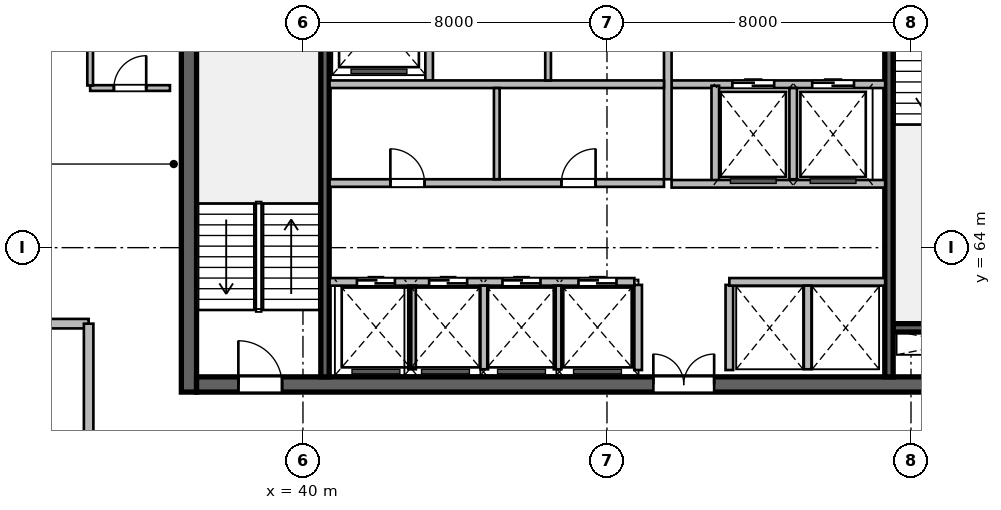
"""IFC4 building model, lengths in metres.
Left out: names, types, materials, properties, quantities, classifications, styles, units other than length and angle.
Written with IfcOpenShell. Run it as: python <this file> out.ifc"""

import sys

from ifc_helpers import new_model, si_unit, direction, frame, frame_2d, origin, place, context, subcontext, project, spatial, rectangle, extrude, source, transform, mapped, element, fill, save


model = new_model("IFC4")
c1 = context("Model", 3, precision=1e-05, world=origin(), true_north=direction((0.0, 1.0)))
c2 = subcontext(c1, "Body", "Model", "MODEL_VIEW")
j1 = project(units=[si_unit("LENGTHUNIT", "METRE"), si_unit("PLANEANGLEUNIT", "RADIAN")], contexts=[c1])
p1 = place(None, origin())
s1 = spatial("IfcSite", under=j1, at=p1, CompositionType="ELEMENT")
p2 = place(p1, origin())
s2 = spatial("IfcBuilding", under=s1, at=p2, CompositionType="ELEMENT")
p3 = place(p2, frame((0.0, 0.0, 267.9)))
s3 = spatial("IfcBuildingStorey", under=s2, at=p3, CompositionType="ELEMENT", Elevation=267.9)
m1 = source(origin(), c2, "Body", "SweptSolid", [
    extrude(rectangle(XDim=12.0, YDim=0.4, at=frame_2d((6.0, 0.0))), origin(), (0.0, 0.0, 1.0), 3.9),
])
p4 = place(p3, frame((37.0, 60.2, 0.0), z_axis=(0.0, 0.0, 1.0), x_axis=(0.0, 1.0, 0.0)))
e1 = element("IfcWall", 1, at=p4, inside=s3, PredefinedType="SHEAR", context=c2, shape_type="MappedRepresentation", body=[
    mapped(m1, transform((0.0, 0.0, 0.0), scale=1.0)),
])
m2 = source(origin(), c2, "Body", "SweptSolid", [
    extrude(rectangle(XDim=21.6, YDim=0.4, at=frame_2d((10.8, 0.0))), origin(), (0.0, 0.0, 1.0), 3.9),
])
p5 = place(p3, frame((37.2, 60.4, 0.0), z_axis=(0.0, 0.0, 1.0), x_axis=(1.0, 0.0, 0.0)))
e2 = element("IfcWall", 2, at=p5, inside=s3, PredefinedType="SHEAR", context=c2, shape_type="MappedRepresentation", body=[
    mapped(m2, transform((0.0, 0.0, 0.0), scale=1.0)),
])
p6 = place(p5, frame((1.1, 0.0, 0.0)))
e3 = element("IfcOpeningElement", 3, at=p6, cuts=e2, PredefinedType="OPENING", context=c2, shape_type="SweptSolid", body=[
    extrude(rectangle(XDim=1.15, YDim=2.15, at=frame_2d((0.575, 1.075))), frame((0.0, 0.21, 0.0), z_axis=(0.0, -1.0, 0.0), x_axis=(1.0, 0.0, 0.0)), (0.0, 0.0, 1.0), 0.42),
])
p7 = place(p5, frame((19.5, 0.0, 0.0)))
e4 = element("IfcOpeningElement", 4, at=p7, cuts=e2, PredefinedType="OPENING", context=c2, shape_type="SweptSolid", body=[
    extrude(rectangle(XDim=0.9, YDim=2.1, at=frame_2d((0.45, 1.05))), frame((0.0, 0.21, 0.0), z_axis=(0.0, -1.0, 0.0), x_axis=(1.0, 0.0, 0.0)), (0.0, 0.0, 1.0), 0.42),
])
p8 = place(p5, frame((12.02, 0.0, 0.0)))
e5 = element("IfcOpeningElement", 5, at=p8, cuts=e2, PredefinedType="OPENING", context=c2, shape_type="SweptSolid", body=[
    extrude(rectangle(XDim=1.6, YDim=2.15, at=frame_2d((0.8, 1.075))), frame((0.0, 0.21, 0.0), z_axis=(0.0, -1.0, 0.0), x_axis=(1.0, 0.0, 0.0)), (0.0, 0.0, 1.0), 0.42),
])
m3 = source(origin(), c2, "Body", "SweptSolid", [
    extrude(rectangle(XDim=3.27, YDim=0.22, at=frame_2d((1.635, 0.0))), origin(), (0.0, 0.0, 1.0), 3.9),
])
p9 = place(p3, frame((55.53, 61.89, 0.0), z_axis=(0.0, 0.0, 1.0), x_axis=(1.0, 0.0, 0.0)))
e6 = element("IfcWall", 6, at=p9, inside=s3, PredefinedType="SHEAR", context=c2, shape_type="MappedRepresentation", body=[
    mapped(m3, transform((0.0, 0.0, 0.0), scale=1.0)),
])
m4 = source(origin(), c2, "Body", "SweptSolid", [
    extrude(rectangle(XDim=11.2, YDim=0.22, at=frame_2d((5.6, 0.0))), origin(), (0.0, 0.0, 1.0), 3.9),
])
p10 = place(p3, frame((40.58, 60.6, 0.0), z_axis=(0.0, 0.0, 1.0), x_axis=(0.0, 1.0, 0.0)))
e7 = element("IfcWall", 7, at=p10, inside=s3, PredefinedType="SHEAR", context=c2, shape_type="MappedRepresentation", body=[
    mapped(m4, transform((0.0, 0.0, 0.0), scale=1.0)),
])
p11 = place(p3, frame((55.42, 60.6, 0.0), z_axis=(0.0, 0.0, 1.0), x_axis=(0.0, 1.0, 0.0)))
e8 = element("IfcWall", 8, at=p11, inside=s3, PredefinedType="SHEAR", context=c2, shape_type="MappedRepresentation", body=[
    mapped(m4, transform((0.0, 0.0, 0.0), scale=1.0)),
])
p12 = place(p11, frame((9.645, 0.0, 0.0)))
e9 = element("IfcOpeningElement", 9, at=p12, cuts=e8, PredefinedType="OPENING", context=c2, shape_type="SweptSolid", body=[
    extrude(rectangle(XDim=1.15, YDim=2.15, at=frame_2d((0.575, 1.075))), frame((0.0, 0.12, 0.0), z_axis=(0.0, -1.0, 0.0), x_axis=(1.0, 0.0, 0.0)), (0.0, 0.0, 1.0), 0.24),
])
m5 = source(origin(), c2, "Body", "SweptSolid", [
    extrude(rectangle(XDim=2.24, YDim=0.2, at=frame_2d((1.12, 0.0))), origin(), (0.0, 0.0, 1.0), 3.65),
])
for number, where, z_axis, x_axis in (
    (10, (48.82, 60.78, 0.0), (0.0, 0.0, 1.0), (0.0, 1.0, 0.0)),
    (11, (51.22, 60.78, 0.0), (0.0, 0.0, 1.0), (0.0, 1.0, 0.0)),
):
    element("IfcWall", number, at=place(p3, frame(where, z_axis=z_axis, x_axis=x_axis)), inside=s3, PredefinedType="SOLIDWALL", context=c2, shape_type="MappedRepresentation", body=[
        mapped(m5, transform((0.0, 0.0, 0.0), scale=1.0)),
    ])
m6 = source(origin(), c2, "Body", "SweptSolid", [
    extrude(rectangle(XDim=5.62, YDim=0.2, at=frame_2d((2.81, 0.0))), origin(), (0.0, 0.0, 1.0), 3.65),
])
p13 = place(p3, frame((49.7, 68.3, 0.0), z_axis=(0.0, 0.0, 1.0), x_axis=(1.0, 0.0, 0.0)))
e12 = element("IfcWall", 12, at=p13, inside=s3, PredefinedType="SOLIDWALL", context=c2, shape_type="MappedRepresentation", body=[
    mapped(m6, transform((0.0, 0.0, 0.0), scale=1.0)),
])
p14 = place(p13, frame((1.6, 0.0, 0.0)))
e13 = element("IfcOpeningElement", 13, at=p14, cuts=e12, PredefinedType="OPENING", context=c2, shape_type="SweptSolid", body=[
    extrude(rectangle(XDim=1.1, YDim=2.15, at=frame_2d((0.55, 1.075))), frame((0.0, 0.11, 0.0), z_axis=(0.0, -1.0, 0.0), x_axis=(1.0, 0.0, 0.0)), (0.0, 0.0, 1.0), 0.22),
])
p15 = place(p13, frame((3.7, 0.0, 0.0)))
e14 = element("IfcOpeningElement", 14, at=p15, cuts=e12, PredefinedType="OPENING", context=c2, shape_type="SweptSolid", body=[
    extrude(rectangle(XDim=1.1, YDim=2.15, at=frame_2d((0.55, 1.075))), frame((0.0, 0.11, 0.0), z_axis=(0.0, -1.0, 0.0), x_axis=(1.0, 0.0, 0.0)), (0.0, 0.0, 1.0), 0.22),
])
m7 = source(origin(), c2, "Body", "SweptSolid", [
    extrude(rectangle(XDim=5.8, YDim=0.2, at=frame_2d((2.9, 0.0))), origin(), (0.0, 0.0, 1.0), 3.65),
])
p16 = place(p3, frame((49.6, 65.8, 0.0), z_axis=(0.0, 0.0, 1.0), x_axis=(0.0, 1.0, 0.0)))
e15 = element("IfcWall", 15, at=p16, inside=s3, PredefinedType="SOLIDWALL", context=c2, shape_type="MappedRepresentation", body=[
    mapped(m7, transform((0.0, 0.0, 0.0), scale=1.0)),
])
m8 = source(origin(), c2, "Body", "SweptSolid", [
    extrude(rectangle(XDim=2.58, YDim=0.2, at=frame_2d((1.29, 0.0))), origin(), (0.0, 0.0, 1.0), 3.65),
])
p17 = place(p3, frame((50.85, 65.68, 0.0), z_axis=(0.0, 0.0, 1.0), x_axis=(0.0, 1.0, 0.0)))
e16 = element("IfcWall", 16, at=p17, inside=s3, PredefinedType="SOLIDWALL", context=c2, shape_type="MappedRepresentation", body=[
    mapped(m8, transform((0.0, 0.0, 0.0), scale=1.0)),
])
m9 = source(origin(), c2, "Body", "SweptSolid", [
    extrude(rectangle(XDim=2.4, YDim=0.2, at=frame_2d((1.2, 0.0))), origin(), (0.0, 0.0, 1.0), 3.65),
])
p18 = place(p3, frame((52.9, 65.8, 0.0), z_axis=(0.0, 0.0, 1.0), x_axis=(0.0, 1.0, 0.0)))
e17 = element("IfcWall", 17, at=p18, inside=s3, PredefinedType="SOLIDWALL", context=c2, shape_type="MappedRepresentation", body=[
    mapped(m9, transform((0.0, 0.0, 0.0), scale=1.0)),
])
p19 = place(p3, frame((49.7, 65.68, 0.0), z_axis=(0.0, 0.0, 1.0), x_axis=(1.0, 0.0, 0.0)))
e18 = element("IfcWall", 18, at=p19, inside=s3, PredefinedType="SOLIDWALL", context=c2, shape_type="MappedRepresentation", body=[
    mapped(m6, transform((0.0, 0.0, 0.0), scale=1.0)),
])
m10 = source(origin(), c2, "Body", "SweptSolid", [
    extrude(rectangle(XDim=3.2, YDim=0.2, at=frame_2d((1.6, 0.0))), origin(), (0.0, 0.0, 1.0), 3.65),
])
p20 = place(p3, frame((43.32, 68.4, 0.0), z_axis=(0.0, 0.0, 1.0), x_axis=(0.0, 1.0, 0.0)))
e19 = element("IfcWall", 19, at=p20, inside=s3, PredefinedType="SOLIDWALL", context=c2, shape_type="MappedRepresentation", body=[
    mapped(m10, transform((0.0, 0.0, 0.0), scale=1.0)),
])
m11 = source(origin(), c2, "Body", "SweptSolid", [
    extrude(rectangle(XDim=8.8, YDim=0.2, at=frame_2d((4.4, 0.0))), origin(), (0.0, 0.0, 1.0), 3.65),
])
p21 = place(p3, frame((40.7, 68.3, 0.0), z_axis=(0.0, 0.0, 1.0), x_axis=(1.0, 0.0, 0.0)))
e20 = element("IfcWall", 20, at=p21, inside=s3, PredefinedType="SOLIDWALL", context=c2, shape_type="MappedRepresentation", body=[
    mapped(m11, transform((0.0, 0.0, 0.0), scale=1.0)),
])
m12 = source(origin(), c2, "Body", "SweptSolid", [
    extrude(rectangle(XDim=3.38, YDim=0.15, at=frame_2d((1.69, 0.0))), origin(), (0.0, 0.0, 1.0), 3.65),
])
p22 = place(p3, frame((46.45, 68.4, 0.0), z_axis=(0.0, 0.0, 1.0), x_axis=(0.0, 1.0, 0.0)))
e21 = element("IfcWall", 21, at=p22, inside=s3, PredefinedType="PARTITIONING", context=c2, shape_type="MappedRepresentation", body=[
    mapped(m12, transform((0.0, 0.0, 0.0), scale=1.0)),
])
m13 = source(origin(), c2, "Body", "SweptSolid", [
    extrude(rectangle(XDim=8.02, YDim=0.2, at=frame_2d((4.01, 0.0))), origin(), (0.0, 0.0, 1.0), 3.65),
])
p23 = place(p3, frame((40.7, 63.1, 0.0), z_axis=(0.0, 0.0, 1.0), x_axis=(1.0, 0.0, 0.0)))
e22 = element("IfcWall", 22, at=p23, inside=s3, PredefinedType="SOLIDWALL", context=c2, shape_type="MappedRepresentation", body=[
    mapped(m13, transform((0.0, 0.0, 0.0), scale=1.0)),
])
p24 = place(p23, frame((0.72, 0.0, 0.0)))
e23 = element("IfcOpeningElement", 23, at=p24, cuts=e22, PredefinedType="OPENING", context=c2, shape_type="SweptSolid", body=[
    extrude(rectangle(XDim=1.0, YDim=2.15, at=frame_2d((0.5, 1.075))), frame((0.0, 0.11, 0.0), z_axis=(0.0, -1.0, 0.0), x_axis=(1.0, 0.0, 0.0)), (0.0, 0.0, 1.0), 0.22),
])
p25 = place(p23, frame((2.62, 0.0, 0.0)))
e24 = element("IfcOpeningElement", 24, at=p25, cuts=e22, PredefinedType="OPENING", context=c2, shape_type="SweptSolid", body=[
    extrude(rectangle(XDim=1.0, YDim=2.15, at=frame_2d((0.5, 1.075))), frame((0.0, 0.11, 0.0), z_axis=(0.0, -1.0, 0.0), x_axis=(1.0, 0.0, 0.0)), (0.0, 0.0, 1.0), 0.22),
])
p26 = place(p23, frame((4.55, 0.0, 0.0)))
e25 = element("IfcOpeningElement", 25, at=p26, cuts=e22, PredefinedType="OPENING", context=c2, shape_type="SweptSolid", body=[
    extrude(rectangle(XDim=1.0, YDim=2.15, at=frame_2d((0.5, 1.075))), frame((0.0, 0.11, 0.0), z_axis=(0.0, -1.0, 0.0), x_axis=(1.0, 0.0, 0.0)), (0.0, 0.0, 1.0), 0.22),
])
p27 = place(p23, frame((6.55, 0.0, 0.0)))
e26 = element("IfcOpeningElement", 26, at=p27, cuts=e22, PredefinedType="OPENING", context=c2, shape_type="SweptSolid", body=[
    extrude(rectangle(XDim=1.0, YDim=2.15, at=frame_2d((0.5, 1.075))), frame((0.0, 0.11, 0.0), z_axis=(0.0, -1.0, 0.0), x_axis=(1.0, 0.0, 0.0)), (0.0, 0.0, 1.0), 0.22),
])
m14 = source(origin(), c2, "Body", "SweptSolid", [
    extrude(rectangle(XDim=4.1, YDim=0.2, at=frame_2d((2.05, 0.0))), origin(), (0.0, 0.0, 1.0), 3.65),
])
p28 = place(p3, frame((51.22, 63.1, 0.0), z_axis=(0.0, 0.0, 1.0), x_axis=(1.0, 0.0, 0.0)))
e27 = element("IfcWall", 27, at=p28, inside=s3, PredefinedType="SOLIDWALL", context=c2, shape_type="MappedRepresentation", body=[
    mapped(m14, transform((0.0, 0.0, 0.0), scale=1.0)),
])
m15 = source(origin(), c2, "Body", "SweptSolid", [
    extrude(rectangle(XDim=2.2, YDim=0.2, at=frame_2d((1.1, 0.0))), origin(), (0.0, 0.0, 1.0), 3.65),
])
for number, where, z_axis, x_axis in (
    (28, (42.87, 60.8, 0.0), (0.0, 0.0, 1.0), (0.0, 1.0, 0.0)),
    (29, (44.77, 60.8, 0.0), (0.0, 0.0, 1.0), (0.0, 1.0, 0.0)),
    (30, (46.7, 60.8, 0.0), (0.0, 0.0, 1.0), (0.0, 1.0, 0.0)),
    (31, (53.28, 60.8, 0.0), (0.0, 0.0, 1.0), (0.0, 1.0, 0.0)),
):
    element("IfcWall", number, at=place(p3, frame(where, z_axis=z_axis, x_axis=x_axis)), inside=s3, PredefinedType="SOLIDWALL", context=c2, shape_type="MappedRepresentation", body=[
        mapped(m15, transform((0.0, 0.0, 0.0), scale=1.0)),
    ])
p29 = place(p3, frame((40.7, 65.7, 0.0), z_axis=(0.0, 0.0, 1.0), x_axis=(1.0, 0.0, 0.0)))
e32 = element("IfcWall", 32, at=p29, inside=s3, PredefinedType="SOLIDWALL", context=c2, shape_type="MappedRepresentation", body=[
    mapped(m11, transform((0.0, 0.0, 0.0), scale=1.0)),
])
p30 = place(p29, frame((1.6, 0.0, 0.0)))
e33 = element("IfcOpeningElement", 33, at=p30, cuts=e32, PredefinedType="OPENING", context=c2, shape_type="SweptSolid", body=[
    extrude(rectangle(XDim=0.9, YDim=2.1, at=frame_2d((0.45, 1.05))), frame((0.0, 0.11, 0.0), z_axis=(0.0, -1.0, 0.0), x_axis=(1.0, 0.0, 0.0)), (0.0, 0.0, 1.0), 0.22),
])
p31 = place(p29, frame((6.1, 0.0, 0.0)))
e34 = element("IfcOpeningElement", 34, at=p31, cuts=e32, PredefinedType="OPENING", context=c2, shape_type="SweptSolid", body=[
    extrude(rectangle(XDim=0.9, YDim=2.1, at=frame_2d((0.45, 1.05))), frame((0.0, 0.11, 0.0), z_axis=(0.0, -1.0, 0.0), x_axis=(1.0, 0.0, 0.0)), (0.0, 0.0, 1.0), 0.22),
])
m16 = source(origin(), c2, "Body", "SweptSolid", [
    extrude(rectangle(XDim=2.4, YDim=0.15, at=frame_2d((1.2, 0.0))), origin(), (0.0, 0.0, 1.0), 3.65),
])
p32 = place(p3, frame((45.1, 65.8, 0.0), z_axis=(0.0, 0.0, 1.0), x_axis=(0.0, 1.0, 0.0)))
e35 = element("IfcWall", 35, at=p32, inside=s3, PredefinedType="PARTITIONING", context=c2, shape_type="MappedRepresentation", body=[
    mapped(m16, transform((0.0, 0.0, 0.0), scale=1.0)),
])
m17 = source(origin(), c2, "Body", "SweptSolid", [
    extrude(rectangle(XDim=2.1, YDim=0.15, at=frame_2d((1.05, 0.0))), origin(), (0.0, 0.0, 1.0), 3.65),
])
p33 = place(p3, frame((34.4, 68.2, 0.0), z_axis=(0.0, 0.0, 1.0), x_axis=(1.0, 0.0, 0.0)))
e36 = element("IfcWall", 36, at=p33, inside=s3, PredefinedType="PARTITIONING", context=c2, shape_type="MappedRepresentation", body=[
    mapped(m17, transform((0.0, 0.0, 0.0), scale=1.0)),
])
p34 = place(p33, frame((0.625, 0.0, 0.0)))
e37 = element("IfcOpeningElement", 37, at=p34, cuts=e36, PredefinedType="OPENING", context=c2, shape_type="SweptSolid", body=[
    extrude(rectangle(XDim=0.85, YDim=2.1, at=frame_2d((0.425, 1.05))), frame((0.0, 0.085, 0.0), z_axis=(0.0, -1.0, 0.0), x_axis=(1.0, 0.0, 0.0)), (0.0, 0.0, 1.0), 0.17),
])
m18 = source(origin(), c2, "Body", "SweptSolid", [
    extrude(rectangle(XDim=3.845, YDim=0.15, at=frame_2d((1.922, 0.0))), origin(), (0.0, 0.0, 1.0), 3.65),
])
p35 = place(p3, frame((34.4, 68.268, 0.0), z_axis=(0.0, 0.0, 1.0), x_axis=(0.0, 1.0, 0.0)))
e38 = element("IfcWall", 38, at=p35, inside=s3, PredefinedType="PARTITIONING", context=c2, shape_type="MappedRepresentation", body=[
    mapped(m18, transform((0.0, 0.0, 0.0), scale=1.0)),
])
m19 = source(origin(), c2, "Body", "SweptSolid", [
    extrude(rectangle(XDim=16.892, YDim=0.25, at=frame_2d((8.446, 0.0))), origin(), (0.0, 0.0, 1.0), 3.65),
])
p36 = place(p3, frame((17.469, 62.0, 0.0), z_axis=(0.0, 0.0, 1.0), x_axis=(1.0, 0.0, 0.0)))
e39 = element("IfcWall", 39, at=p36, inside=s3, PredefinedType="PARTITIONING", context=c2, shape_type="MappedRepresentation", body=[
    mapped(m19, transform((0.0, 0.0, 0.0), scale=1.0)),
])
m20 = source(origin(), c2, "Body", "SweptSolid", [
    extrude(rectangle(XDim=4.04, YDim=0.25, at=frame_2d((2.02, 0.0))), origin(), (0.0, 0.0, 1.0), 3.65),
])
p37 = place(p3, frame((34.36, 57.96, 0.0), z_axis=(0.0, 0.0, 1.0), x_axis=(0.0, 1.0, 0.0)))
e40 = element("IfcWall", 40, at=p37, inside=s3, PredefinedType="PARTITIONING", context=c2, shape_type="MappedRepresentation", body=[
    mapped(m20, transform((0.0, 0.0, 0.0), scale=1.0)),
])
m21 = source(origin(), c2, "Body", "SweptSolid", [
    extrude(rectangle(XDim=1.15, YDim=2.15, at=frame_2d((0.575, 1.075))), frame((0.0, 0.025, 0.0), z_axis=(0.0, -1.0, 0.0), x_axis=(1.0, 0.0, 0.0)), (0.0, 0.0, 1.0), 0.05),
])
p38 = place(p6, origin())
e41 = element("IfcDoor", 41, at=p38, inside=s3, OperationType="SINGLE_SWING_LEFT", PredefinedType="DOOR", context=c2, shape_type="MappedRepresentation", body=[
    mapped(m21, transform((0.0, 0.0, 0.0), scale=1.0)),
])
fill(e3, e41)
m22 = source(origin(), c2, "Body", "SweptSolid", [
    extrude(rectangle(XDim=1.6, YDim=2.15, at=frame_2d((0.8, 1.075))), frame((0.0, 0.025, 0.0), z_axis=(0.0, -1.0, 0.0), x_axis=(1.0, 0.0, 0.0)), (0.0, 0.0, 1.0), 0.05),
])
p39 = place(p8, origin())
e42 = element("IfcDoor", 42, at=p39, inside=s3, OperationType="DOUBLE_DOOR_SINGLE_SWING", PredefinedType="DOOR", context=c2, shape_type="MappedRepresentation", body=[
    mapped(m22, transform((0.0, 0.0, 0.0), scale=1.0)),
])
fill(e5, e42)
m23 = source(origin(), c2, "Body", "SweptSolid", [
    extrude(rectangle(XDim=1.1, YDim=2.15, at=frame_2d((0.55, 1.075))), frame((0.0, 0.025, 0.0), z_axis=(0.0, -1.0, 0.0), x_axis=(1.0, 0.0, 0.0)), (0.0, 0.0, 1.0), 0.05),
])
p40 = place(p14, origin())
e43 = element("IfcDoor", 43, at=p40, inside=s3, OperationType="DOUBLE_DOOR_SLIDING", PredefinedType="DOOR", context=c2, shape_type="MappedRepresentation", body=[
    mapped(m23, transform((0.0, 0.0, 0.0), scale=1.0)),
])
fill(e13, e43)
p41 = place(p15, origin())
e44 = element("IfcDoor", 44, at=p41, inside=s3, OperationType="DOUBLE_DOOR_SLIDING", PredefinedType="DOOR", context=c2, shape_type="MappedRepresentation", body=[
    mapped(m23, transform((0.0, 0.0, 0.0), scale=1.0)),
])
fill(e14, e44)
m24 = source(origin(), c2, "Body", "SweptSolid", [
    extrude(rectangle(XDim=1.0, YDim=2.15, at=frame_2d((0.5, 1.075))), frame((0.0, 0.025, 0.0), z_axis=(0.0, -1.0, 0.0), x_axis=(1.0, 0.0, 0.0)), (0.0, 0.0, 1.0), 0.05),
])
p42 = place(p24, origin())
e45 = element("IfcDoor", 45, at=p42, inside=s3, OperationType="DOUBLE_DOOR_SLIDING", PredefinedType="DOOR", context=c2, shape_type="MappedRepresentation", body=[
    mapped(m24, transform((0.0, 0.0, 0.0), scale=1.0)),
])
fill(e23, e45)
p43 = place(p25, origin())
e46 = element("IfcDoor", 46, at=p43, inside=s3, OperationType="DOUBLE_DOOR_SLIDING", PredefinedType="DOOR", context=c2, shape_type="MappedRepresentation", body=[
    mapped(m24, transform((0.0, 0.0, 0.0), scale=1.0)),
])
fill(e24, e46)
p44 = place(p26, origin())
e47 = element("IfcDoor", 47, at=p44, inside=s3, OperationType="DOUBLE_DOOR_SLIDING", PredefinedType="DOOR", context=c2, shape_type="MappedRepresentation", body=[
    mapped(m24, transform((0.0, 0.0, 0.0), scale=1.0)),
])
fill(e25, e47)
p45 = place(p27, origin())
e48 = element("IfcDoor", 48, at=p45, inside=s3, OperationType="DOUBLE_DOOR_SLIDING", PredefinedType="DOOR", context=c2, shape_type="MappedRepresentation", body=[
    mapped(m24, transform((0.0, 0.0, 0.0), scale=1.0)),
])
fill(e26, e48)
m25 = source(origin(), c2, "Body", "SweptSolid", [
    extrude(rectangle(XDim=0.9, YDim=2.1, at=frame_2d((0.45, 1.05))), frame((0.0, 0.025, 0.0), z_axis=(0.0, -1.0, 0.0), x_axis=(1.0, 0.0, 0.0)), (0.0, 0.0, 1.0), 0.05),
])
p46 = place(p30, origin())
e49 = element("IfcDoor", 49, at=p46, inside=s3, OperationType="SINGLE_SWING_LEFT", PredefinedType="DOOR", context=c2, shape_type="MappedRepresentation", body=[
    mapped(m25, transform((0.0, 0.0, 0.0), scale=1.0)),
])
fill(e33, e49)
p47 = place(p31, origin())
e50 = element("IfcDoor", 50, at=p47, inside=s3, OperationType="SINGLE_SWING_RIGHT", PredefinedType="DOOR", context=c2, shape_type="MappedRepresentation", body=[
    mapped(m25, transform((0.0, 0.0, 0.0), scale=1.0)),
])
fill(e34, e50)
m26 = source(origin(), c2, "Body", "SweptSolid", [
    extrude(rectangle(XDim=0.85, YDim=2.1, at=frame_2d((0.425, 1.05))), frame((0.0, 0.025, 0.0), z_axis=(0.0, -1.0, 0.0), x_axis=(1.0, 0.0, 0.0)), (0.0, 0.0, 1.0), 0.05),
])
p48 = place(p34, origin())
e51 = element("IfcDoor", 51, at=p48, inside=s3, OperationType="SINGLE_SWING_RIGHT", PredefinedType="DOOR", context=c2, shape_type="MappedRepresentation", body=[
    mapped(m26, transform((0.0, 0.0, 0.0), scale=1.0)),
])
fill(e37, e51)
save(model, sys.argv[1])
